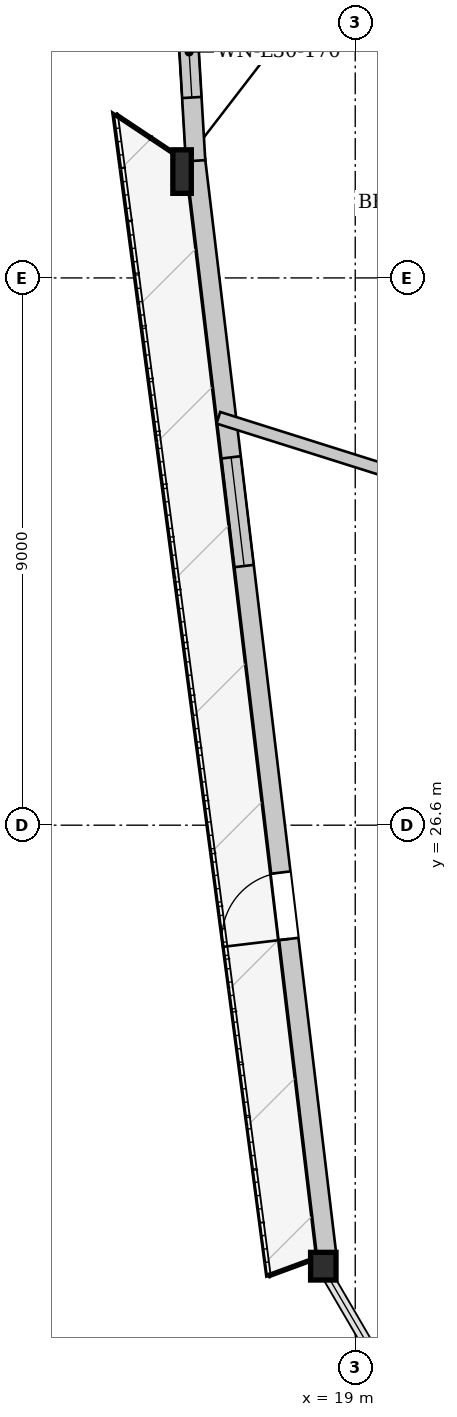
"""IFC4 building model, lengths in metres.
Left out: names, types, materials, properties, quantities, classifications, styles, units other than length and angle.
Written with IfcOpenShell. Run it as: python <this file> out.ifc"""

import sys

from ifc_helpers import new_model, si_unit, direction, frame, frame_2d, origin, origin_2d, place, context, subcontext, project, spatial, rectangle, i_section, extrude, source, transform, mapped, element, fill, save


model = new_model("IFC4")
c1 = context("Model", 3, precision=1e-05, world=origin(), true_north=direction((0.0, 1.0)))
c2 = subcontext(c1, "Body", "Model", "MODEL_VIEW")
j1 = project(units=[si_unit("LENGTHUNIT", "METRE"), si_unit("PLANEANGLEUNIT", "RADIAN")], contexts=[c1])
p1 = place(None, origin())
s1 = spatial("IfcSite", under=j1, at=p1, CompositionType="ELEMENT")
p2 = place(p1, origin())
s2 = spatial("IfcBuilding", under=s1, at=p2, CompositionType="ELEMENT")
p3 = place(p2, frame((0.0, 0.0, 116.35)))
s3 = spatial("IfcBuildingStorey", under=s2, at=p3, CompositionType="ELEMENT", Elevation=116.35)
m1 = source(origin(), c2, "Body", "SweptSolid", [
    extrude(i_section(OverallWidth=0.304, OverallDepth=0.716, WebThickness=0.021, FlangeThickness=0.04, at=origin_2d()), origin(), (0.0, 0.0, 1.0), 3.404),
])
p4 = place(p3, frame((16.214, 37.518, 0.0), z_axis=(-0.03650577529, -0.099117841751, 0.994405843616), x_axis=(0.938377890114, -0.345610959528, 0.0)))
e1 = element("IfcColumn", 1, at=p4, inside=s3, PredefinedType="COLUMN", context=c2, shape_type="MappedRepresentation", body=[
    mapped(m1, transform((0.0, 0.0, 0.0), x_axis=(1.0, 0.0, 0.0), y_axis=(0.0, 1.0, 0.0), z_axis=(0.0, 0.0, 1.0), scale=1.0)),
])
m2 = source(origin(), c2, "Body", "SweptSolid", [
    extrude(i_section(OverallWidth=0.418, OverallDepth=0.455, WebThickness=0.038, FlangeThickness=0.059, at=origin_2d()), origin(), (0.0, 0.0, 1.0), 3.402),
])
p5 = place(p3, frame((18.374, 19.485, 0.0), z_axis=(0.059560945923, -0.080730197787, 0.994954837611), x_axis=(0.804696120474, 0.593686915549, 0.0)))
e2 = element("IfcColumn", 2, at=p5, inside=s3, PredefinedType="COLUMN", context=c2, shape_type="MappedRepresentation", body=[
    mapped(m2, transform((0.0, 0.0, 0.0), x_axis=(1.0, 0.0, 0.0), y_axis=(0.0, 1.0, 0.0), z_axis=(0.0, 0.0, 1.0), scale=1.0)),
])
p6 = place(p3, frame((18.532, 19.504, 0.0), z_axis=(0.0, 0.0, 1.0), x_axis=(-0.118889186276, 0.992907529122, 0.0)))
e3 = element("IfcWall", 3, at=p6, inside=s3, PredefinedType="SOLIDWALL", context=c2, shape_type="SweptSolid", body=[
    extrude(rectangle(XDim=18.161, YDim=0.32, at=frame_2d((9.081, 0.0))), origin(), (0.0, 0.0, 1.0), 2.692),
])
p7 = place(p6, frame((5.262, 0.0, 0.0)))
e4 = element("IfcOpeningElement", 4, at=p7, cuts=e3, PredefinedType="OPENING", context=c2, shape_type="SweptSolid", body=[
    extrude(rectangle(XDim=1.1, YDim=2.3, at=frame_2d((0.55, 1.15))), frame((0.0, 0.17, 0.0), z_axis=(0.0, -1.0, 0.0), x_axis=(1.0, 0.0, 0.0)), (0.0, 0.0, 1.0), 0.34),
])
p8 = place(p6, frame((11.439, 0.0, 0.372)))
e5 = element("IfcOpeningElement", 5, at=p8, cuts=e3, PredefinedType="OPENING", context=c2, shape_type="SweptSolid", body=[
    extrude(rectangle(XDim=1.8, YDim=2.2, at=frame_2d((0.9, 1.1))), frame((0.0, 0.17, 0.0), z_axis=(0.0, -1.0, 0.0), x_axis=(1.0, 0.0, 0.0)), (0.0, 0.0, 1.0), 0.34),
])
p9 = place(p3, frame((16.374, 37.527, 0.0), z_axis=(0.0, 0.0, 1.0), x_axis=(-0.059001592377, 0.998257888572, 0.0)))
e6 = element("IfcWall", 6, at=p9, inside=s3, PredefinedType="SOLIDWALL", context=c2, shape_type="SweptSolid", body=[
    extrude(rectangle(XDim=3.583, YDim=0.32, at=frame_2d((1.792, 0.0))), origin(), (0.0, 0.0, 1.0), 2.692),
])
p10 = place(p9, frame((1.042, 0.0, 0.272)))
e7 = element("IfcOpeningElement", 7, at=p10, cuts=e6, PredefinedType="OPENING", context=c2, shape_type="SweptSolid", body=[
    extrude(rectangle(XDim=1.5, YDim=2.3, at=frame_2d((0.75, 1.15))), frame((0.0, 0.17, 0.0), z_axis=(0.0, -1.0, 0.0), x_axis=(1.0, 0.0, 0.0)), (0.0, 0.0, 1.0), 0.34),
])
p11 = place(p3, frame((27.45, 29.927, 0.0), z_axis=(0.0, 0.0, 1.0), x_axis=(-0.953718389909, 0.300701235031, 0.0)))
e8 = element("IfcWall", 8, at=p11, inside=s3, PredefinedType="PARTITIONING", context=c2, shape_type="SweptSolid", body=[
    extrude(rectangle(XDim=11.22, YDim=0.2, at=frame_2d((5.61, 0.0))), origin(), (0.0, 0.0, 1.0), 3.3),
])
m3 = source(origin(), c2, "Body", "SweptSolid", [
    extrude(rectangle(XDim=1.1, YDim=2.3, at=frame_2d((0.55, 1.15))), frame((0.0, 0.025, 0.0), z_axis=(0.0, -1.0, 0.0), x_axis=(1.0, 0.0, 0.0)), (0.0, 0.0, 1.0), 0.05),
])
p12 = place(p7, origin())
e9 = element("IfcDoor", 9, at=p12, inside=s3, OperationType="SINGLE_SWING_LEFT", PredefinedType="DOOR", context=c2, shape_type="MappedRepresentation", body=[
    mapped(m3, transform((0.0, 0.0, 0.0), x_axis=(1.0, 0.0, 0.0), y_axis=(0.0, 1.0, 0.0), z_axis=(0.0, 0.0, 1.0), scale=1.0)),
])
fill(e4, e9)
m4 = source(origin(), c2, "Body", "SweptSolid", [
    extrude(rectangle(XDim=1.8, YDim=2.2, at=frame_2d((0.9, 1.1))), frame((0.0, 0.03, 0.0), z_axis=(0.0, -1.0, 0.0), x_axis=(1.0, 0.0, 0.0)), (0.0, 0.0, 1.0), 0.06),
])
p13 = place(p8, origin())
e10 = element("IfcWindow", 10, at=p13, inside=s3, PartitioningType="SINGLE_PANEL", PredefinedType="WINDOW", context=c2, shape_type="MappedRepresentation", body=[
    mapped(m4, transform((0.0, 0.0, 0.0), x_axis=(1.0, 0.0, 0.0), y_axis=(0.0, 1.0, 0.0), z_axis=(0.0, 0.0, 1.0), scale=1.0)),
])
fill(e5, e10)
m5 = source(origin(), c2, "Body", "SweptSolid", [
    extrude(rectangle(XDim=1.5, YDim=2.3, at=frame_2d((0.75, 1.15))), frame((0.0, 0.03, 0.0), z_axis=(0.0, -1.0, 0.0), x_axis=(1.0, 0.0, 0.0)), (0.0, 0.0, 1.0), 0.06),
])
p14 = place(p10, origin())
e11 = element("IfcWindow", 11, at=p14, inside=s3, PartitioningType="SINGLE_PANEL", PredefinedType="WINDOW", context=c2, shape_type="MappedRepresentation", body=[
    mapped(m5, transform((0.0, 0.0, 0.0), x_axis=(1.0, 0.0, 0.0), y_axis=(0.0, 1.0, 0.0), z_axis=(0.0, 0.0, 1.0), scale=1.0)),
])
fill(e7, e11)
save(model, sys.argv[1])
